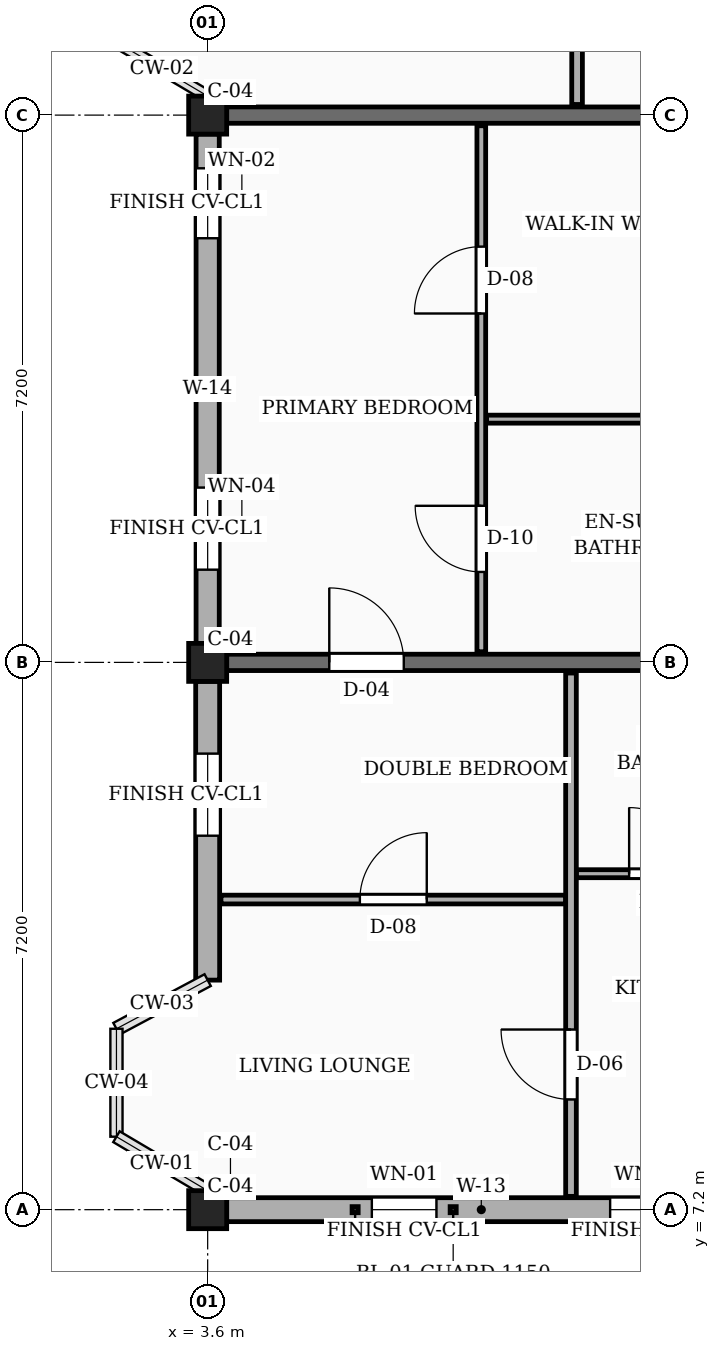
"""IFC4 building model, lengths in metres.
Left out: names, types, materials, properties, quantities, classifications, styles, units other than length and angle.
Written with IfcOpenShell. Run it as: python <this file> out.ifc"""

import sys

from ifc_helpers import new_model, si_unit, direction, frame, frame_2d, origin, origin_2d, place, context, subcontext, project, spatial, rectangle, extrude, element, fill, save


model = new_model("IFC4")
c1 = context("Model", 3, precision=1e-05, world=origin(), true_north=direction((0.0, 1.0)))
c2 = subcontext(c1, "Body", "Model", "MODEL_VIEW")
j1 = project(units=[si_unit("LENGTHUNIT", "METRE"), si_unit("PLANEANGLEUNIT", "RADIAN")], contexts=[c1])
p1 = place(None, origin())
s1 = spatial("IfcSite", under=j1, at=p1, CompositionType="ELEMENT")
p2 = place(p1, origin())
s2 = spatial("IfcBuilding", under=s1, at=p2, CompositionType="ELEMENT")
p3 = place(p2, frame((0.0, 0.0, 26.55)))
s3 = spatial("IfcBuildingStorey", under=s2, at=p3, CompositionType="ELEMENT", Elevation=26.55)
for number, where, z_axis, x_axis in (
    (1, (3.6, 7.2, 0.0), (0.0, 0.0, 1.0), (1.0, 0.0, 0.0)),
    (2, (3.6, 14.4, 0.0), (0.0, 0.0, 1.0), (1.0, 0.0, 0.0)),
    (3, (3.6, 21.6, 0.0), (0.0, 0.0, 1.0), (1.0, 0.0, 0.0)),
):
    element("IfcColumn", number, at=place(p3, frame(where, z_axis=z_axis, x_axis=x_axis)), inside=s3, PredefinedType="COLUMN", context=c2, shape_type="SweptSolid", body=[
        extrude(rectangle(XDim=0.5, YDim=0.5, at=origin_2d()), origin(), (0.0, 0.0, 1.0), 3.15),
    ])
p4 = place(p3, frame((3.85, 14.4, 0.0), z_axis=(0.0, 0.0, 1.0), x_axis=(1.0, 0.0, 0.0)))
e4 = element("IfcWall", 4, at=p4, inside=s3, PredefinedType="SOLIDWALL", context=c2, shape_type="SweptSolid", body=[
    extrude(rectangle(XDim=6.75, YDim=0.215, at=frame_2d((3.375, 0.0))), origin(), (0.0, 0.0, 1.0), 2.17),
])
p5 = place(p4, frame((1.35, 0.0, 0.0)))
e5 = element("IfcOpeningElement", 5, at=p5, cuts=e4, PredefinedType="OPENING", context=c2, shape_type="SweptSolid", body=[
    extrude(rectangle(XDim=0.98, YDim=2.12, at=frame_2d((0.49, 1.06))), frame((0.0, 0.118, 0.0), z_axis=(0.0, -1.0, 0.0), x_axis=(1.0, 0.0, 0.0)), (0.0, 0.0, 1.0), 0.235),
])
p6 = place(p3, frame((3.85, 21.6, 0.0), z_axis=(0.0, 0.0, 1.0), x_axis=(1.0, 0.0, 0.0)))
e6 = element("IfcWall", 6, at=p6, inside=s3, PredefinedType="SOLIDWALL", context=c2, shape_type="SweptSolid", body=[
    extrude(rectangle(XDim=6.75, YDim=0.215, at=frame_2d((3.375, 0.0))), origin(), (0.0, 0.0, 1.0), 2.17),
])
p7 = place(p3, frame((3.85, 7.2, 0.0), z_axis=(0.0, 0.0, 1.0), x_axis=(1.0, 0.0, 0.0)))
e7 = element("IfcWall", 7, at=p7, inside=s3, PredefinedType="SOLIDWALL", context=c2, shape_type="SweptSolid", body=[
    extrude(rectangle(XDim=6.7, YDim=0.315, at=frame_2d((3.35, 0.0))), origin(), (0.0, 0.0, 1.0), 2.44),
])
p8 = place(p7, frame((1.91, 0.0, 0.78)))
e8 = element("IfcOpeningElement", 8, at=p8, cuts=e7, PredefinedType="OPENING", context=c2, shape_type="SweptSolid", body=[
    extrude(rectangle(XDim=0.85, YDim=1.15, at=frame_2d((0.425, 0.575))), frame((0.0, 0.167, 0.0), z_axis=(0.0, -1.0, 0.0), x_axis=(1.0, 0.0, 0.0)), (0.0, 0.0, 1.0), 0.335),
])
p9 = place(p7, frame((5.045, 0.0, 0.78)))
e9 = element("IfcOpeningElement", 9, at=p9, cuts=e7, PredefinedType="OPENING", context=c2, shape_type="SweptSolid", body=[
    extrude(rectangle(XDim=1.0, YDim=1.15, at=frame_2d((0.5, 0.575))), frame((0.0, 0.167, 0.0), z_axis=(0.0, -1.0, 0.0), x_axis=(1.0, 0.0, 0.0)), (0.0, 0.0, 1.0), 0.335),
])
p10 = place(p3, frame((3.6, 21.35, 0.0), z_axis=(0.0, 0.0, 1.0), x_axis=(0.0, -1.0, 0.0)))
e10 = element("IfcWall", 10, at=p10, inside=s3, PredefinedType="SOLIDWALL", context=c2, shape_type="SweptSolid", body=[
    extrude(rectangle(XDim=6.7, YDim=0.305, at=frame_2d((3.35, 0.0))), origin(), (0.0, 0.0, 1.0), 2.44),
])
p11 = place(p10, frame((0.45, 0.0, 0.78)))
e11 = element("IfcOpeningElement", 11, at=p11, cuts=e10, PredefinedType="OPENING", context=c2, shape_type="SweptSolid", body=[
    extrude(rectangle(XDim=0.92, YDim=1.15, at=frame_2d((0.46, 0.575))), frame((0.0, 0.163, 0.0), z_axis=(0.0, -1.0, 0.0), x_axis=(1.0, 0.0, 0.0)), (0.0, 0.0, 1.0), 0.325),
])
p12 = place(p10, frame((4.65, 0.0, 0.78)))
e12 = element("IfcOpeningElement", 12, at=p12, cuts=e10, PredefinedType="OPENING", context=c2, shape_type="SweptSolid", body=[
    extrude(rectangle(XDim=1.08, YDim=1.15, at=frame_2d((0.54, 0.575))), frame((0.0, 0.163, 0.0), z_axis=(0.0, -1.0, 0.0), x_axis=(1.0, 0.0, 0.0)), (0.0, 0.0, 1.0), 0.325),
])
p13 = place(p3, frame((3.6, 14.15, 0.0), z_axis=(0.0, 0.0, 1.0), x_axis=(0.0, -1.0, 0.0)))
e13 = element("IfcWall", 13, at=p13, inside=s3, PredefinedType="SOLIDWALL", context=c2, shape_type="SweptSolid", body=[
    extrude(rectangle(XDim=3.93, YDim=0.315, at=frame_2d((1.965, 0.0))), origin(), (0.0, 0.0, 1.0), 2.44),
])
p14 = place(p13, frame((0.95, 0.0, 0.78)))
e14 = element("IfcOpeningElement", 14, at=p14, cuts=e13, PredefinedType="OPENING", context=c2, shape_type="SweptSolid", body=[
    extrude(rectangle(XDim=1.08, YDim=1.15, at=frame_2d((0.54, 0.575))), frame((0.0, 0.167, 0.0), z_axis=(0.0, -1.0, 0.0), x_axis=(1.0, 0.0, 0.0)), (0.0, 0.0, 1.0), 0.335),
])
p15 = place(p3, frame((3.775, 11.28, 0.0), z_axis=(0.0, 0.0, 1.0), x_axis=(1.0, 0.0, 0.0)))
e15 = element("IfcWall", 15, at=p15, inside=s3, PredefinedType="PARTITIONING", context=c2, shape_type="SweptSolid", body=[
    extrude(rectangle(XDim=4.535, YDim=0.115, at=frame_2d((2.268, 0.0))), origin(), (0.0, 0.0, 1.0), 2.305),
])
p16 = place(p15, frame((1.827, 0.0, 0.0)))
e16 = element("IfcOpeningElement", 16, at=p16, cuts=e15, PredefinedType="OPENING", context=c2, shape_type="SweptSolid", body=[
    extrude(rectangle(XDim=0.88, YDim=2.08, at=frame_2d((0.44, 1.04))), frame((0.0, 0.067, 0.0), z_axis=(0.0, -1.0, 0.0), x_axis=(1.0, 0.0, 0.0)), (0.0, 0.0, 1.0), 0.135),
])
p17 = place(p3, frame((8.45, 11.62, 0.0), z_axis=(0.0, 0.0, 1.0), x_axis=(1.0, 0.0, 0.0)))
e17 = element("IfcWall", 17, at=p17, inside=s3, PredefinedType="PARTITIONING", context=c2, shape_type="SweptSolid", body=[
    extrude(rectangle(XDim=2.26, YDim=0.105, at=frame_2d((1.13, 0.0))), origin(), (0.0, 0.0, 1.0), 2.305),
])
p18 = place(p17, frame((0.695, 0.0, 0.0)))
e18 = element("IfcOpeningElement", 18, at=p18, cuts=e17, PredefinedType="OPENING", context=c2, shape_type="SweptSolid", body=[
    extrude(rectangle(XDim=0.87, YDim=2.05, at=frame_2d((0.435, 1.025))), frame((0.0, 0.062, 0.0), z_axis=(0.0, -1.0, 0.0), x_axis=(1.0, 0.0, 0.0)), (0.0, 0.0, 1.0), 0.125),
])
p19 = place(p3, frame((8.38, 7.375, 0.0), z_axis=(0.0, 0.0, 1.0), x_axis=(0.0, 1.0, 0.0)))
e19 = element("IfcWall", 19, at=p19, inside=s3, PredefinedType="PARTITIONING", context=c2, shape_type="SweptSolid", body=[
    extrude(rectangle(XDim=6.885, YDim=0.14, at=frame_2d((3.442, 0.0))), origin(), (0.0, 0.0, 1.0), 2.305),
])
p20 = place(p19, frame((1.275, 0.0, 0.0)))
e20 = element("IfcOpeningElement", 20, at=p20, cuts=e19, PredefinedType="OPENING", context=c2, shape_type="SweptSolid", body=[
    extrude(rectangle(XDim=0.92, YDim=2.1, at=frame_2d((0.46, 1.05))), frame((0.0, 0.08, 0.0), z_axis=(0.0, -1.0, 0.0), x_axis=(1.0, 0.0, 0.0)), (0.0, 0.0, 1.0), 0.16),
])
p21 = place(p3, frame((7.2, 14.54, 0.0), z_axis=(0.0, 0.0, 1.0), x_axis=(0.0, 1.0, 0.0)))
e21 = element("IfcWall", 21, at=p21, inside=s3, PredefinedType="PARTITIONING", context=c2, shape_type="SweptSolid", body=[
    extrude(rectangle(XDim=6.92, YDim=0.115, at=frame_2d((3.46, 0.0))), origin(), (0.0, 0.0, 1.0), 2.305),
])
p22 = place(p21, frame((1.05, 0.0, 0.0)))
e22 = element("IfcOpeningElement", 22, at=p22, cuts=e21, PredefinedType="OPENING", context=c2, shape_type="SweptSolid", body=[
    extrude(rectangle(XDim=0.87, YDim=2.05, at=frame_2d((0.435, 1.025))), frame((0.0, 0.067, 0.0), z_axis=(0.0, -1.0, 0.0), x_axis=(1.0, 0.0, 0.0)), (0.0, 0.0, 1.0), 0.135),
])
p23 = place(p21, frame((4.45, 0.0, 0.0)))
e23 = element("IfcOpeningElement", 23, at=p23, cuts=e21, PredefinedType="OPENING", context=c2, shape_type="SweptSolid", body=[
    extrude(rectangle(XDim=0.88, YDim=2.08, at=frame_2d((0.44, 1.04))), frame((0.0, 0.067, 0.0), z_axis=(0.0, -1.0, 0.0), x_axis=(1.0, 0.0, 0.0)), (0.0, 0.0, 1.0), 0.135),
])
p24 = place(p3, frame((7.27, 17.6, 0.0), z_axis=(0.0, 0.0, 1.0), x_axis=(1.0, 0.0, 0.0)))
e24 = element("IfcWall", 24, at=p24, inside=s3, PredefinedType="PARTITIONING", context=c2, shape_type="SweptSolid", body=[
    extrude(rectangle(XDim=3.39, YDim=0.105, at=frame_2d((1.695, 0.0))), origin(), (0.0, 0.0, 1.0), 2.305),
])
p25 = place(p3, frame((8.46, 21.74, 0.0), z_axis=(0.0, 0.0, 1.0), x_axis=(0.0, 1.0, 0.0)))
e25 = element("IfcWall", 25, at=p25, inside=s3, PredefinedType="PARTITIONING", context=c2, shape_type="SweptSolid", body=[
    extrude(rectangle(XDim=6.92, YDim=0.14, at=frame_2d((3.46, 0.0))), origin(), (0.0, 0.0, 1.0), 2.305),
])
p26 = place(p25, frame((1.31, 0.0, 0.0)))
e26 = element("IfcOpeningElement", 26, at=p26, cuts=e25, PredefinedType="OPENING", context=c2, shape_type="SweptSolid", body=[
    extrude(rectangle(XDim=0.92, YDim=2.1, at=frame_2d((0.46, 1.05))), frame((0.0, 0.08, 0.0), z_axis=(0.0, -1.0, 0.0), x_axis=(1.0, 0.0, 0.0)), (0.0, 0.0, 1.0), 0.16),
])
p27 = place(p8, origin())
e27 = element("IfcWindow", 27, at=p27, inside=s3, PartitioningType="SINGLE_PANEL", PredefinedType="WINDOW", context=c2, shape_type="SweptSolid", body=[
    extrude(rectangle(XDim=0.85, YDim=1.15, at=frame_2d((0.425, 0.575))), frame((0.0, 0.03, 0.0), z_axis=(0.0, -1.0, 0.0), x_axis=(1.0, 0.0, 0.0)), (0.0, 0.0, 1.0), 0.06),
])
fill(e8, e27)
p28 = place(p9, origin())
e28 = element("IfcWindow", 28, at=p28, inside=s3, PartitioningType="SINGLE_PANEL", PredefinedType="WINDOW", context=c2, shape_type="SweptSolid", body=[
    extrude(rectangle(XDim=1.0, YDim=1.15, at=frame_2d((0.5, 0.575))), frame((0.0, 0.03, 0.0), z_axis=(0.0, -1.0, 0.0), x_axis=(1.0, 0.0, 0.0)), (0.0, 0.0, 1.0), 0.06),
])
fill(e9, e28)
p29 = place(p11, origin())
e29 = element("IfcWindow", 29, at=p29, inside=s3, PartitioningType="SINGLE_PANEL", PredefinedType="WINDOW", context=c2, shape_type="SweptSolid", body=[
    extrude(rectangle(XDim=0.92, YDim=1.15, at=frame_2d((0.46, 0.575))), frame((0.0, 0.03, 0.0), z_axis=(0.0, -1.0, 0.0), x_axis=(1.0, 0.0, 0.0)), (0.0, 0.0, 1.0), 0.06),
])
fill(e11, e29)
p30 = place(p12, origin())
e30 = element("IfcWindow", 30, at=p30, inside=s3, PartitioningType="SINGLE_PANEL", PredefinedType="WINDOW", context=c2, shape_type="SweptSolid", body=[
    extrude(rectangle(XDim=1.08, YDim=1.15, at=frame_2d((0.54, 0.575))), frame((0.0, 0.03, 0.0), z_axis=(0.0, -1.0, 0.0), x_axis=(1.0, 0.0, 0.0)), (0.0, 0.0, 1.0), 0.06),
])
fill(e12, e30)
p31 = place(p14, origin())
e31 = element("IfcWindow", 31, at=p31, inside=s3, PartitioningType="SINGLE_PANEL", PredefinedType="WINDOW", context=c2, shape_type="SweptSolid", body=[
    extrude(rectangle(XDim=1.08, YDim=1.15, at=frame_2d((0.54, 0.575))), frame((0.0, 0.03, 0.0), z_axis=(0.0, -1.0, 0.0), x_axis=(1.0, 0.0, 0.0)), (0.0, 0.0, 1.0), 0.06),
])
fill(e14, e31)
p32 = place(p16, origin())
e32 = element("IfcDoor", 32, at=p32, inside=s3, OperationType="SINGLE_SWING_RIGHT", PredefinedType="DOOR", context=c2, shape_type="SweptSolid", body=[
    extrude(rectangle(XDim=0.88, YDim=2.08, at=frame_2d((0.44, 1.04))), frame((0.0, 0.025, 0.0), z_axis=(0.0, -1.0, 0.0), x_axis=(1.0, 0.0, 0.0)), (0.0, 0.0, 1.0), 0.05),
])
fill(e16, e32)
p33 = place(p18, origin())
e33 = element("IfcDoor", 33, at=p33, inside=s3, OperationType="SINGLE_SWING_LEFT", PredefinedType="DOOR", context=c2, shape_type="SweptSolid", body=[
    extrude(rectangle(XDim=0.87, YDim=2.05, at=frame_2d((0.435, 1.025))), frame((0.0, 0.025, 0.0), z_axis=(0.0, -1.0, 0.0), x_axis=(1.0, 0.0, 0.0)), (0.0, 0.0, 1.0), 0.05),
])
fill(e18, e33)
p34 = place(p20, origin())
e34 = element("IfcDoor", 34, at=p34, inside=s3, OperationType="SINGLE_SWING_RIGHT", PredefinedType="DOOR", context=c2, shape_type="SweptSolid", body=[
    extrude(rectangle(XDim=0.92, YDim=2.1, at=frame_2d((0.46, 1.05))), frame((0.0, 0.025, 0.0), z_axis=(0.0, -1.0, 0.0), x_axis=(1.0, 0.0, 0.0)), (0.0, 0.0, 1.0), 0.05),
])
fill(e20, e34)
p35 = place(p22, origin())
e35 = element("IfcDoor", 35, at=p35, inside=s3, OperationType="SINGLE_SWING_RIGHT", PredefinedType="DOOR", context=c2, shape_type="SweptSolid", body=[
    extrude(rectangle(XDim=0.87, YDim=2.05, at=frame_2d((0.435, 1.025))), frame((0.0, 0.025, 0.0), z_axis=(0.0, -1.0, 0.0), x_axis=(1.0, 0.0, 0.0)), (0.0, 0.0, 1.0), 0.05),
])
fill(e22, e35)
p36 = place(p23, origin())
e36 = element("IfcDoor", 36, at=p36, inside=s3, OperationType="SINGLE_SWING_LEFT", PredefinedType="DOOR", context=c2, shape_type="SweptSolid", body=[
    extrude(rectangle(XDim=0.88, YDim=2.08, at=frame_2d((0.44, 1.04))), frame((0.0, 0.025, 0.0), z_axis=(0.0, -1.0, 0.0), x_axis=(1.0, 0.0, 0.0)), (0.0, 0.0, 1.0), 0.05),
])
fill(e23, e36)
p37 = place(p5, origin())
e37 = element("IfcDoor", 37, at=p37, inside=s3, OperationType="SINGLE_SWING_LEFT", PredefinedType="DOOR", context=c2, shape_type="SweptSolid", body=[
    extrude(rectangle(XDim=0.98, YDim=2.12, at=frame_2d((0.49, 1.06))), frame((0.0, 0.025, 0.0), z_axis=(0.0, -1.0, 0.0), x_axis=(1.0, 0.0, 0.0)), (0.0, 0.0, 1.0), 0.05),
])
fill(e5, e37)
save(model, sys.argv[1])
